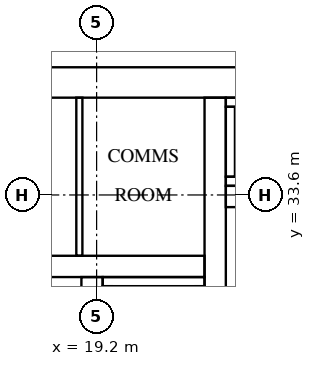
"""IFC4 building model, lengths in metres.
Left out: names, types, materials, properties, quantities, classifications, styles, units other than length and angle.
Written with IfcOpenShell. Run it as: python <this file> out.ifc"""

import sys

from ifc_helpers import new_model, si_unit, direction, frame, frame_2d, origin, place, context, subcontext, project, spatial, rectangle, extrude, element, fill, save


model = new_model("IFC4")
c1 = context("Model", 3, precision=1e-05, world=origin(), true_north=direction((0.0, 1.0)))
c2 = subcontext(c1, "Body", "Model", "MODEL_VIEW")
j1 = project(units=[si_unit("LENGTHUNIT", "METRE"), si_unit("PLANEANGLEUNIT", "RADIAN")], contexts=[c1])
p1 = place(None, origin())
s1 = spatial("IfcSite", under=j1, at=p1, CompositionType="ELEMENT")
p2 = place(p1, origin())
s2 = spatial("IfcBuilding", under=s1, at=p2, CompositionType="ELEMENT")
p3 = place(p2, origin())
s3 = spatial("IfcBuildingStorey", under=s2, at=p3, CompositionType="ELEMENT", Elevation=0.0)
p4 = place(p3, frame((15.0, 37.3, 0.0), z_axis=(0.0, 0.0, 1.0), x_axis=(1.0, 0.0, 0.0)))
e1 = element("IfcWall", 1, at=p4, inside=s3, PredefinedType="SHEAR", context=c2, shape_type="SweptSolid", body=[
    extrude(rectangle(XDim=32.4, YDim=1.0, at=frame_2d((16.2, 0.0))), origin(), (0.0, 0.0, 1.0), 5.7),
])
p5 = place(p4, frame((15.3, 0.0, 0.0)))
e2 = element("IfcOpeningElement", 2, at=p5, cuts=e1, PredefinedType="OPENING", context=c2, shape_type="SweptSolid", body=[
    extrude(rectangle(XDim=1.8, YDim=2.1, at=frame_2d((0.9, 1.05))), frame((0.0, 0.51, 0.0), z_axis=(0.0, -1.0, 0.0), x_axis=(1.0, 0.0, 0.0)), (0.0, 0.0, 1.0), 1.02),
])
p6 = place(p4, frame((1.766, 0.0, 0.0)))
e3 = element("IfcOpeningElement", 3, at=p6, cuts=e1, PredefinedType="OPENING", context=c2, shape_type="SweptSolid", body=[
    extrude(rectangle(XDim=1.0, YDim=2.1, at=frame_2d((0.5, 1.05))), frame((0.0, 0.51, 0.0), z_axis=(0.0, -1.0, 0.0), x_axis=(1.0, 0.0, 0.0)), (0.0, 0.0, 1.0), 1.02),
])
p7 = place(p4, frame((5.241, 0.0, 0.0)))
e4 = element("IfcOpeningElement", 4, at=p7, cuts=e1, PredefinedType="OPENING", context=c2, shape_type="SweptSolid", body=[
    extrude(rectangle(XDim=1.0, YDim=2.1, at=frame_2d((0.5, 1.05))), frame((0.0, 0.51, 0.0), z_axis=(0.0, -1.0, 0.0), x_axis=(1.0, 0.0, 0.0)), (0.0, 0.0, 1.0), 1.02),
])
p8 = place(p3, frame((19.05, 16.0, 0.0), z_axis=(0.0, 0.0, 1.0), x_axis=(0.0, 1.0, 0.0)))
e5 = element("IfcWall", 5, at=p8, inside=s3, PredefinedType="SHEAR", context=c2, shape_type="SweptSolid", body=[
    extrude(rectangle(XDim=14.9, YDim=0.7, at=frame_2d((7.45, 0.0))), origin(), (0.0, 0.0, 1.0), 5.7),
])
p9 = place(p8, frame((9.45, 0.0, 0.0)))
e6 = element("IfcOpeningElement", 6, at=p9, cuts=e5, PredefinedType="OPENING", context=c2, shape_type="SweptSolid", body=[
    extrude(rectangle(XDim=1.1, YDim=2.1, at=frame_2d((0.55, 1.05))), frame((0.0, 0.36, 0.0), z_axis=(0.0, -1.0, 0.0), x_axis=(1.0, 0.0, 0.0)), (0.0, 0.0, 1.0), 0.72),
])
p10 = place(p8, frame((12.95, 0.0, 0.0)))
e7 = element("IfcOpeningElement", 7, at=p10, cuts=e5, PredefinedType="OPENING", context=c2, shape_type="SweptSolid", body=[
    extrude(rectangle(XDim=1.1, YDim=2.1, at=frame_2d((0.55, 1.05))), frame((0.0, 0.36, 0.0), z_axis=(0.0, -1.0, 0.0), x_axis=(1.0, 0.0, 0.0)), (0.0, 0.0, 1.0), 0.72),
])
p11 = place(p8, frame((0.2, 0.0, 0.0)))
e8 = element("IfcOpeningElement", 8, at=p11, cuts=e5, PredefinedType="OPENING", context=c2, shape_type="SweptSolid", body=[
    extrude(rectangle(XDim=1.2, YDim=2.1, at=frame_2d((0.6, 1.05))), frame((0.0, 0.36, 0.0), z_axis=(0.0, -1.0, 0.0), x_axis=(1.0, 0.0, 0.0)), (0.0, 0.0, 1.0), 0.72),
])
p12 = place(p3, frame((23.1, 16.0, 0.0), z_axis=(0.0, 0.0, 1.0), x_axis=(0.0, 1.0, 0.0)))
e9 = element("IfcWall", 9, at=p12, inside=s3, PredefinedType="SHEAR", context=c2, shape_type="SweptSolid", body=[
    extrude(rectangle(XDim=20.8, YDim=0.7, at=frame_2d((10.4, 0.0))), origin(), (0.0, 0.0, 1.0), 5.7),
])
p13 = place(p3, frame((16.0, 31.25, 0.0), z_axis=(0.0, 0.0, 1.0), x_axis=(1.0, 0.0, 0.0)))
e10 = element("IfcWall", 10, at=p13, inside=s3, PredefinedType="SHEAR", context=c2, shape_type="SweptSolid", body=[
    extrude(rectangle(XDim=6.75, YDim=0.7, at=frame_2d((3.375, 0.0))), origin(), (0.0, 0.0, 1.0), 5.7),
])
p14 = place(p3, frame((23.45, 33.55, 0.0), z_axis=(0.0, 0.0, 1.0), x_axis=(1.0, 0.0, 0.0)))
e11 = element("IfcWall", 11, at=p14, inside=s3, PredefinedType="SHEAR", context=c2, shape_type="SweptSolid", body=[
    extrude(rectangle(XDim=5.6, YDim=0.7, at=frame_2d((2.8, 0.0))), origin(), (0.0, 0.0, 1.0), 5.7),
])
p15 = place(p14, frame((0.625, 0.0, 0.0)))
e12 = element("IfcOpeningElement", 12, at=p15, cuts=e11, PredefinedType="OPENING", context=c2, shape_type="SweptSolid", body=[
    extrude(rectangle(XDim=1.1, YDim=2.1, at=frame_2d((0.55, 1.05))), frame((0.0, 0.36, 0.0), z_axis=(0.0, -1.0, 0.0), x_axis=(1.0, 0.0, 0.0)), (0.0, 0.0, 1.0), 0.72),
])
p16 = place(p14, frame((3.175, 0.0, 0.0)))
e13 = element("IfcOpeningElement", 13, at=p16, cuts=e11, PredefinedType="OPENING", context=c2, shape_type="SweptSolid", body=[
    extrude(rectangle(XDim=1.1, YDim=2.1, at=frame_2d((0.55, 1.05))), frame((0.0, 0.36, 0.0), z_axis=(0.0, -1.0, 0.0), x_axis=(1.0, 0.0, 0.0)), (0.0, 0.0, 1.0), 0.72),
])
for number, where, z_axis, x_axis in (
    (14, (23.45, 34.05, -1.8), (0.0, 0.0, 1.0), (1.0, 0.0, 0.0)),
    (15, (23.45, 36.65, -1.8), (0.0, 0.0, 1.0), (1.0, 0.0, 0.0)),
):
    element("IfcWall", number, at=place(p3, frame(where, z_axis=z_axis, x_axis=x_axis)), inside=s3, PredefinedType="SOLIDWALL", context=c2, shape_type="SweptSolid", body=[
        extrude(rectangle(XDim=2.35, YDim=0.3, at=frame_2d((1.175, 0.0))), origin(), (0.0, 0.0, 1.0), 1.8),
    ])
p17 = place(p3, frame((23.6, 34.2, -1.8), z_axis=(0.0, 0.0, 1.0), x_axis=(0.0, 1.0, 0.0)))
e16 = element("IfcWall", 16, at=p17, inside=s3, PredefinedType="SOLIDWALL", context=c2, shape_type="SweptSolid", body=[
    extrude(rectangle(XDim=2.3, YDim=0.3, at=frame_2d((1.15, 0.0))), origin(), (0.0, 0.0, 1.0), 1.8),
])
p18 = place(p3, frame((19.4, 30.75, -1.8), z_axis=(0.0, 0.0, 1.0), x_axis=(1.0, 0.0, 0.0)))
e17 = element("IfcWall", 17, at=p18, inside=s3, PredefinedType="SOLIDWALL", context=c2, shape_type="SweptSolid", body=[
    extrude(rectangle(XDim=3.35, YDim=0.3, at=frame_2d((1.675, 0.0))), origin(), (0.0, 0.0, 1.0), 1.8),
])
p19 = place(p3, frame((18.633, 31.6, 0.0), z_axis=(0.0, 0.0, 1.0), x_axis=(0.0, 1.0, 0.0)))
e18 = element("IfcWall", 18, at=p19, inside=s3, PredefinedType="PARTITIONING", context=c2, shape_type="SweptSolid", body=[
    extrude(rectangle(XDim=5.2, YDim=0.2, at=frame_2d((2.6, 0.0))), origin(), (0.0, 0.0, 1.0), 5.7),
])
p20 = place(p6, origin())
e19 = element("IfcDoor", 19, at=p20, inside=s3, OperationType="SINGLE_SWING_LEFT", PredefinedType="DOOR", context=c2, shape_type="SweptSolid", body=[
    extrude(rectangle(XDim=1.0, YDim=2.1, at=frame_2d((0.5, 1.05))), frame((0.0, 0.025, 0.0), z_axis=(0.0, -1.0, 0.0), x_axis=(1.0, 0.0, 0.0)), (0.0, 0.0, 1.0), 0.05),
])
fill(e3, e19)
p21 = place(p7, origin())
e20 = element("IfcDoor", 20, at=p21, inside=s3, OperationType="SINGLE_SWING_RIGHT", PredefinedType="DOOR", context=c2, shape_type="SweptSolid", body=[
    extrude(rectangle(XDim=1.0, YDim=2.1, at=frame_2d((0.5, 1.05))), frame((0.0, 0.025, 0.0), z_axis=(0.0, -1.0, 0.0), x_axis=(1.0, 0.0, 0.0)), (0.0, 0.0, 1.0), 0.05),
])
fill(e4, e20)
save(model, sys.argv[1])
